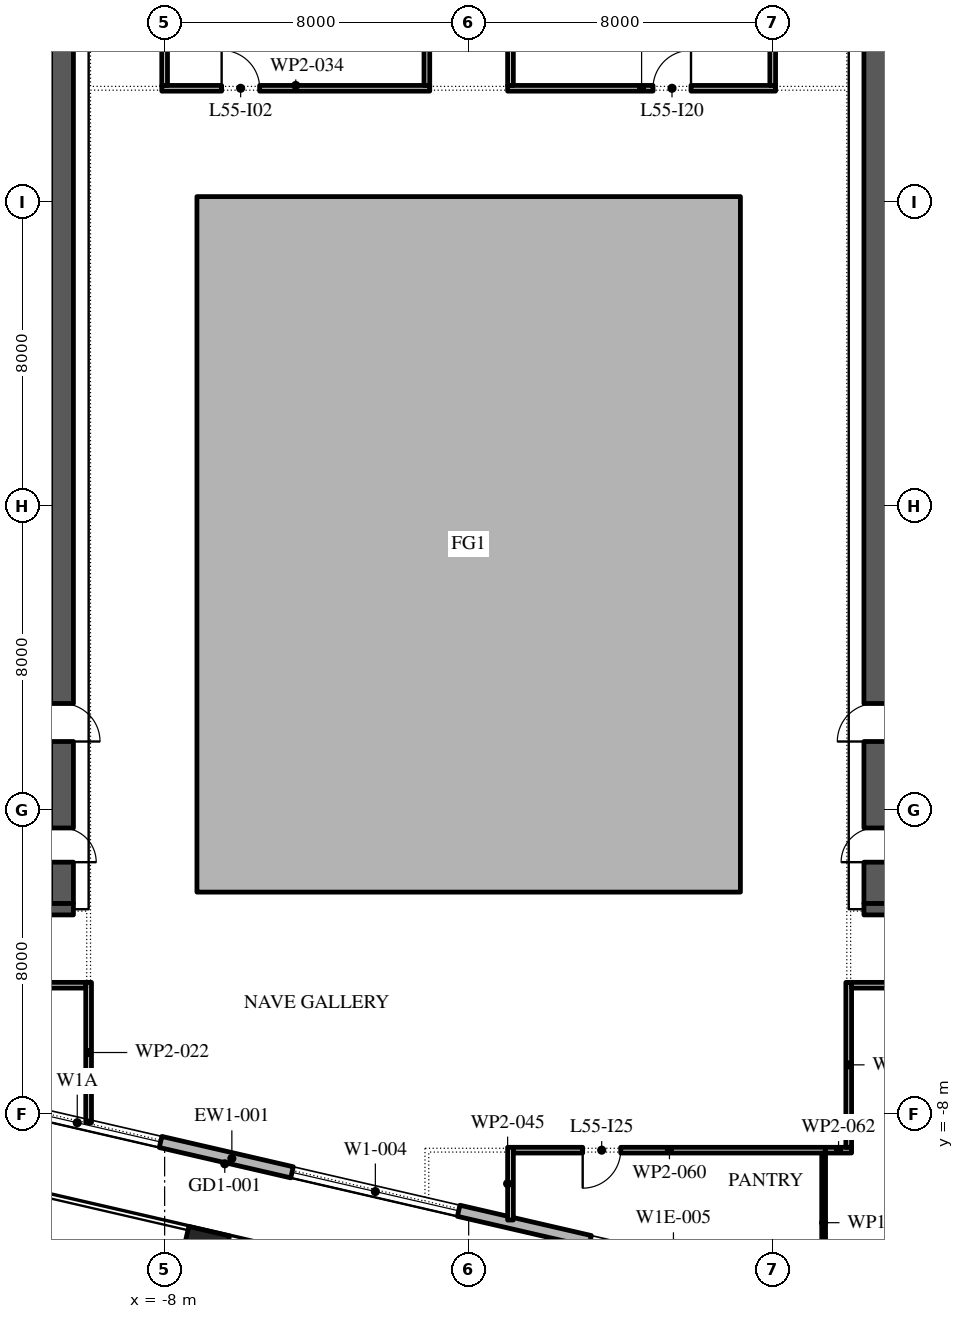
"""IFC4 building model, lengths in metres.
Left out: names, types, materials, properties, quantities, classifications, styles, units other than length and angle.
Written with IfcOpenShell. Run it as: python <this file> out.ifc"""

import sys

from ifc_helpers import new_model, si_unit, direction, frame, frame_2d, origin, origin_2d, place, context, subcontext, project, spatial, polyline, rectangle, outline, extrude, element, fill, save


model = new_model("IFC4")
c1 = context("Model", 3, precision=1e-05, world=origin(), true_north=direction((0.0, 1.0)))
c2 = subcontext(c1, "Body", "Model", "MODEL_VIEW")
j1 = project(units=[si_unit("LENGTHUNIT", "METRE"), si_unit("PLANEANGLEUNIT", "RADIAN")], contexts=[c1])
p1 = place(None, origin())
s1 = spatial("IfcSite", under=j1, at=p1, CompositionType="ELEMENT")
p2 = place(p1, origin())
s2 = spatial("IfcBuilding", under=s1, at=p2, CompositionType="ELEMENT")
p3 = place(p2, frame((0.0, 0.0, 255.6)))
s3 = spatial("IfcBuildingStorey", under=s2, at=p3, CompositionType="ELEMENT", Elevation=255.6)
p4 = place(p3, frame((-6.951, -11.608, 0.0), z_axis=(0.0, 0.0, 1.0), x_axis=(0.974370064785, -0.224951054344, 0.0)))
e1 = element("IfcColumn", 1, at=p4, inside=s3, PredefinedType="COLUMN", context=c2, shape_type="SweptSolid", body=[
    extrude(rectangle(XDim=1.1, YDim=1.1, at=origin_2d()), origin(), (0.0, 0.0, 1.0), 4.2),
])
p5 = place(p3, origin())
e2 = element("IfcWall", 2, at=p5, inside=s3, PredefinedType="STANDARD", context=c2, shape_type="SweptSolid", body=[
    extrude(outline(polyline([(-7.15, -2.15), (7.15, -2.15), (7.15, 16.15), (-7.15, 16.15), (-7.15, -2.15)]), holes=[polyline([(-7.0, -2.0), (-7.0, 16.0), (7.0, 16.0), (7.0, -2.0), (-7.0, -2.0)])]), origin(), (0.0, 0.0, 1.0), 4.0),
])
p6 = place(p3, frame((-29.616, -3.758, 0.0), z_axis=(0.0, 0.0, 1.0), x_axis=(0.974370532314, -0.224949029246, 0.0)))
e3 = element("IfcWall", 3, at=p6, inside=s3, PredefinedType="STANDARD", context=c2, shape_type="SweptSolid", body=[
    extrude(rectangle(XDim=48.0, YDim=0.3, at=frame_2d((24.0, 0.0))), origin(), (0.0, 0.0, 1.0), 4.0),
])
p7 = place(p6, frame((1.625, 0.0, 0.45)))
e4 = element("IfcOpeningElement", 4, at=p7, cuts=e3, PredefinedType="OPENING", context=c2, shape_type="SweptSolid", body=[
    extrude(rectangle(XDim=4.5, YDim=3.05, at=frame_2d((2.25, 1.525))), frame((0.0, 0.16, 0.0), z_axis=(0.0, -1.0, 0.0), x_axis=(1.0, 0.0, 0.0)), (0.0, 0.0, 1.0), 0.32),
])
p8 = place(p6, frame((10.575, 0.0, 0.0)))
e5 = element("IfcOpeningElement", 5, at=p8, cuts=e3, PredefinedType="OPENING", context=c2, shape_type="SweptSolid", body=[
    extrude(rectangle(XDim=2.4, YDim=3.5, at=frame_2d((1.2, 1.75))), frame((0.0, 0.16, 0.0), z_axis=(0.0, -1.0, 0.0), x_axis=(1.0, 0.0, 0.0)), (0.0, 0.0, 1.0), 0.32),
])
p9 = place(p6, frame((17.575, 0.0, 0.45)))
e6 = element("IfcOpeningElement", 6, at=p9, cuts=e3, PredefinedType="OPENING", context=c2, shape_type="SweptSolid", body=[
    extrude(rectangle(XDim=4.5, YDim=3.0, at=frame_2d((2.25, 1.5))), frame((0.0, 0.16, 0.0), z_axis=(0.0, -1.0, 0.0), x_axis=(1.0, 0.0, 0.0)), (0.0, 0.0, 1.0), 0.32),
])
p10 = place(p6, frame((25.625, 0.0, 0.45)))
e7 = element("IfcOpeningElement", 7, at=p10, cuts=e3, PredefinedType="OPENING", context=c2, shape_type="SweptSolid", body=[
    extrude(rectangle(XDim=4.5, YDim=3.05, at=frame_2d((2.25, 1.525))), frame((0.0, 0.16, 0.0), z_axis=(0.0, -1.0, 0.0), x_axis=(1.0, 0.0, 0.0)), (0.0, 0.0, 1.0), 0.32),
])
p11 = place(p6, frame((33.675, 0.0, 0.45)))
e8 = element("IfcOpeningElement", 8, at=p11, cuts=e3, PredefinedType="OPENING", context=c2, shape_type="SweptSolid", body=[
    extrude(rectangle(XDim=4.5, YDim=2.825, at=frame_2d((2.25, 1.413))), frame((0.0, 0.16, 0.0), z_axis=(0.0, -1.0, 0.0), x_axis=(1.0, 0.0, 0.0)), (0.0, 0.0, 1.0), 0.32),
])
p12 = place(p6, frame((42.775, 0.0, 0.0)))
e9 = element("IfcOpeningElement", 9, at=p12, cuts=e3, PredefinedType="OPENING", context=c2, shape_type="SweptSolid", body=[
    extrude(rectangle(XDim=2.4, YDim=3.5, at=frame_2d((1.2, 1.75))), frame((0.0, 0.16, 0.0), z_axis=(0.0, -1.0, 0.0), x_axis=(1.0, 0.0, 0.0)), (0.0, 0.0, 1.0), 0.32),
])
p13 = place(p3, frame((-10.7, -2.45, 0.0), z_axis=(0.0, 0.0, 1.0), x_axis=(0.0, 1.0, 0.0)))
e10 = element("IfcWall", 10, at=p13, inside=s3, PredefinedType="SHEAR", context=c2, shape_type="SweptSolid", body=[
    extrude(rectangle(XDim=27.9, YDim=0.6, at=frame_2d((13.95, 0.0))), origin(), (0.0, 0.0, 1.0), 4.0),
])
p14 = place(p13, frame((23.65, 0.0, 0.0)))
e11 = element("IfcOpeningElement", 11, at=p14, cuts=e10, PredefinedType="OPENING", context=c2, shape_type="SweptSolid", body=[
    extrude(rectangle(XDim=2.4, YDim=2.1, at=frame_2d((1.2, 1.05))), frame((0.0, 0.31, 0.0), z_axis=(0.0, -1.0, 0.0), x_axis=(1.0, 0.0, 0.0)), (0.0, 0.0, 1.0), 0.62),
])
p15 = place(p13, frame((1.087, 0.0, 0.0)))
e12 = element("IfcOpeningElement", 12, at=p15, cuts=e10, PredefinedType="OPENING", context=c2, shape_type="SweptSolid", body=[
    extrude(rectangle(XDim=0.9, YDim=2.1, at=frame_2d((0.45, 1.05))), frame((0.0, 0.31, 0.0), z_axis=(0.0, -1.0, 0.0), x_axis=(1.0, 0.0, 0.0)), (0.0, 0.0, 1.0), 0.62),
])
p16 = place(p13, frame((4.262, 0.0, 0.0)))
e13 = element("IfcOpeningElement", 13, at=p16, cuts=e10, PredefinedType="OPENING", context=c2, shape_type="SweptSolid", body=[
    extrude(rectangle(XDim=1.0, YDim=2.1, at=frame_2d((0.5, 1.05))), frame((0.0, 0.31, 0.0), z_axis=(0.0, -1.0, 0.0), x_axis=(1.0, 0.0, 0.0)), (0.0, 0.0, 1.0), 0.62),
])
p17 = place(p3, frame((-21.6, -2.6, 0.0), z_axis=(0.0, 0.0, 1.0), x_axis=(1.0, 0.0, 0.0)))
e14 = element("IfcWall", 14, at=p17, inside=s3, PredefinedType="SHEAR", context=c2, shape_type="SweptSolid", body=[
    extrude(rectangle(XDim=11.2, YDim=0.3, at=frame_2d((5.6, 0.0))), origin(), (0.0, 0.0, 1.0), 4.0),
])
p18 = place(p3, frame((10.7, -2.45, 0.0), z_axis=(0.0, 0.0, 1.0), x_axis=(0.0, 1.0, 0.0)))
e15 = element("IfcWall", 15, at=p18, inside=s3, PredefinedType="SHEAR", context=c2, shape_type="SweptSolid", body=[
    extrude(rectangle(XDim=27.9, YDim=0.6, at=frame_2d((13.95, 0.0))), origin(), (0.0, 0.0, 1.0), 4.0),
])
p19 = place(p18, frame((23.65, 0.0, 0.0)))
e16 = element("IfcOpeningElement", 16, at=p19, cuts=e15, PredefinedType="OPENING", context=c2, shape_type="SweptSolid", body=[
    extrude(rectangle(XDim=2.4, YDim=2.1, at=frame_2d((1.2, 1.05))), frame((0.0, 0.31, 0.0), z_axis=(0.0, -1.0, 0.0), x_axis=(1.0, 0.0, 0.0)), (0.0, 0.0, 1.0), 0.62),
])
p20 = place(p18, frame((1.087, 0.0, 0.0)))
e17 = element("IfcOpeningElement", 17, at=p20, cuts=e15, PredefinedType="OPENING", context=c2, shape_type="SweptSolid", body=[
    extrude(rectangle(XDim=0.9, YDim=2.1, at=frame_2d((0.45, 1.05))), frame((0.0, 0.31, 0.0), z_axis=(0.0, -1.0, 0.0), x_axis=(1.0, 0.0, 0.0)), (0.0, 0.0, 1.0), 0.62),
])
p21 = place(p18, frame((4.262, 0.0, 0.0)))
e18 = element("IfcOpeningElement", 18, at=p21, cuts=e15, PredefinedType="OPENING", context=c2, shape_type="SweptSolid", body=[
    extrude(rectangle(XDim=1.0, YDim=2.1, at=frame_2d((0.5, 1.05))), frame((0.0, 0.31, 0.0), z_axis=(0.0, -1.0, 0.0), x_axis=(1.0, 0.0, 0.0)), (0.0, 0.0, 1.0), 0.62),
])
p22 = place(p3, frame((10.4, -2.6, 0.0), z_axis=(0.0, 0.0, 1.0), x_axis=(1.0, 0.0, 0.0)))
e19 = element("IfcWall", 19, at=p22, inside=s3, PredefinedType="SHEAR", context=c2, shape_type="SweptSolid", body=[
    extrude(rectangle(XDim=11.2, YDim=0.3, at=frame_2d((5.6, 0.0))), origin(), (0.0, 0.0, 1.0), 4.0),
])
p23 = place(p3, frame((-10.0, -8.216, 0.0), z_axis=(0.0, 0.0, 1.0), x_axis=(0.0, 1.0, 0.0)))
e20 = element("IfcWall", 20, at=p23, inside=s3, PredefinedType="PARTITIONING", context=c2, shape_type="SweptSolid", body=[
    extrude(rectangle(XDim=3.691, YDim=0.15, at=frame_2d((1.846, 0.0))), origin(), (0.0, 0.0, 1.0), 4.0),
])
p24 = place(p3, frame((-10.075, -4.6, 0.0), z_axis=(0.0, 0.0, 1.0), x_axis=(-1.0, 0.0, 0.0)))
e21 = element("IfcWall", 21, at=p24, inside=s3, PredefinedType="PARTITIONING", context=c2, shape_type="SweptSolid", body=[
    extrude(rectangle(XDim=11.88, YDim=0.15, at=frame_2d((5.94, 0.0))), origin(), (0.0, 0.0, 1.0), 4.0),
])
p25 = place(p24, frame((3.055, 0.0, 0.0)))
e22 = element("IfcOpeningElement", 22, at=p25, cuts=e21, PredefinedType="OPENING", context=c2, shape_type="SweptSolid", body=[
    extrude(rectangle(XDim=1.0, YDim=2.1, at=frame_2d((0.5, 1.05))), frame((0.0, 0.085, 0.0), z_axis=(0.0, -1.0, 0.0), x_axis=(1.0, 0.0, 0.0)), (0.0, 0.0, 1.0), 0.17),
])
p26 = place(p3, frame((-8.075, 19.0, 0.0), z_axis=(0.0, 0.0, 1.0), x_axis=(1.0, 0.0, 0.0)))
e23 = element("IfcWall", 23, at=p26, inside=s3, PredefinedType="PARTITIONING", context=c2, shape_type="SweptSolid", body=[
    extrude(rectangle(XDim=7.05, YDim=0.15, at=frame_2d((3.525, 0.0))), origin(), (0.0, 0.0, 1.0), 4.0),
])
p27 = place(p26, frame((1.575, 0.0, 0.0)))
e24 = element("IfcOpeningElement", 24, at=p27, cuts=e23, PredefinedType="OPENING", context=c2, shape_type="SweptSolid", body=[
    extrude(rectangle(XDim=1.0, YDim=2.1, at=frame_2d((0.5, 1.05))), frame((0.0, 0.085, 0.0), z_axis=(0.0, -1.0, 0.0), x_axis=(1.0, 0.0, 0.0)), (0.0, 0.0, 1.0), 0.17),
])
p28 = place(p3, frame((-8.0, 22.72, 0.0), z_axis=(0.0, 0.0, 1.0), x_axis=(0.0, -1.0, 0.0)))
e25 = element("IfcWall", 25, at=p28, inside=s3, PredefinedType="PARTITIONING", context=c2, shape_type="SweptSolid", body=[
    extrude(rectangle(XDim=3.645, YDim=0.15, at=frame_2d((1.823, 0.0))), origin(), (0.0, 0.0, 1.0), 4.0),
])
p29 = place(p3, frame((-1.1, 19.075, 0.0), z_axis=(0.0, 0.0, 1.0), x_axis=(0.0, 1.0, 0.0)))
e26 = element("IfcWall", 26, at=p29, inside=s3, PredefinedType="PARTITIONING", context=c2, shape_type="SweptSolid", body=[
    extrude(rectangle(XDim=3.595, YDim=0.15, at=frame_2d((1.797, 0.0))), origin(), (0.0, 0.0, 1.0), 4.0),
])
p30 = place(p3, frame((1.1, -8.865, 0.0), z_axis=(0.0, 0.0, 1.0), x_axis=(0.0, -1.0, 0.0)))
e27 = element("IfcWall", 27, at=p30, inside=s3, PredefinedType="PARTITIONING", context=c2, shape_type="SweptSolid", body=[
    extrude(rectangle(XDim=1.913, YDim=0.15, at=frame_2d((0.957, 0.0))), origin(), (0.0, 0.0, 1.0), 4.0),
])
p31 = place(p3, frame((1.025, 19.0, 0.0), z_axis=(0.0, 0.0, 1.0), x_axis=(1.0, 0.0, 0.0)))
e28 = element("IfcWall", 28, at=p31, inside=s3, PredefinedType="PARTITIONING", context=c2, shape_type="SweptSolid", body=[
    extrude(rectangle(XDim=7.05, YDim=0.15, at=frame_2d((3.525, 0.0))), origin(), (0.0, 0.0, 1.0), 4.0),
])
p32 = place(p31, frame((3.825, 0.0, 0.0)))
e29 = element("IfcOpeningElement", 29, at=p32, cuts=e28, PredefinedType="OPENING", context=c2, shape_type="SweptSolid", body=[
    extrude(rectangle(XDim=1.0, YDim=2.1, at=frame_2d((0.5, 1.05))), frame((0.0, 0.085, 0.0), z_axis=(0.0, -1.0, 0.0), x_axis=(1.0, 0.0, 0.0)), (0.0, 0.0, 1.0), 0.17),
])
p33 = place(p3, frame((1.1, 24.0, 0.0), z_axis=(0.0, 0.0, 1.0), x_axis=(0.0, -1.0, 0.0)))
e30 = element("IfcWall", 30, at=p33, inside=s3, PredefinedType="PARTITIONING", context=c2, shape_type="SweptSolid", body=[
    extrude(rectangle(XDim=4.925, YDim=0.15, at=frame_2d((2.462, 0.0))), origin(), (0.0, 0.0, 1.0), 4.0),
])
p34 = place(p3, frame((8.0, 19.075, 0.0), z_axis=(0.0, 0.0, 1.0), x_axis=(0.0, 1.0, 0.0)))
e31 = element("IfcWall", 31, at=p34, inside=s3, PredefinedType="PARTITIONING", context=c2, shape_type="SweptSolid", body=[
    extrude(rectangle(XDim=4.875, YDim=0.15, at=frame_2d((2.438, 0.0))), origin(), (0.0, 0.0, 1.0), 4.0),
])
p35 = place(p3, frame((9.39, -8.94, 0.0), z_axis=(0.0, 0.0, 1.0), x_axis=(-1.0, 0.0, 0.0)))
e32 = element("IfcWall", 32, at=p35, inside=s3, PredefinedType="PARTITIONING", context=c2, shape_type="SweptSolid", body=[
    extrude(rectangle(XDim=8.215, YDim=0.15, at=frame_2d((4.107, 0.0))), origin(), (0.0, 0.0, 1.0), 4.0),
])
p36 = place(p35, frame((5.39, 0.0, 0.0)))
e33 = element("IfcOpeningElement", 33, at=p36, cuts=e32, PredefinedType="OPENING", context=c2, shape_type="SweptSolid", body=[
    extrude(rectangle(XDim=1.0, YDim=2.1, at=frame_2d((0.5, 1.05))), frame((0.0, 0.085, 0.0), z_axis=(0.0, -1.0, 0.0), x_axis=(1.0, 0.0, 0.0)), (0.0, 0.0, 1.0), 0.17),
])
p37 = place(p3, frame((9.34, -9.015, 0.0), z_axis=(0.0, 0.0, 1.0), x_axis=(0.0, -1.0, 0.0)))
e34 = element("IfcWall", 34, at=p37, inside=s3, PredefinedType="PARTITIONING", context=c2, shape_type="SweptSolid", body=[
    extrude(rectangle(XDim=3.666, YDim=0.1, at=frame_2d((1.833, 0.0))), origin(), (0.0, 0.0, 1.0), 4.0),
])
p38 = place(p3, frame((10.075, -8.94, 0.0), z_axis=(0.0, 0.0, 1.0), x_axis=(-1.0, 0.0, 0.0)))
e35 = element("IfcWall", 35, at=p38, inside=s3, PredefinedType="PARTITIONING", context=c2, shape_type="SweptSolid", body=[
    extrude(rectangle(XDim=0.685, YDim=0.15, at=frame_2d((0.343, 0.0))), origin(), (0.0, 0.0, 1.0), 4.0),
])
p39 = place(p3, frame((10.0, -4.525, 0.0), z_axis=(0.0, 0.0, 1.0), x_axis=(0.0, -1.0, 0.0)))
e36 = element("IfcWall", 36, at=p39, inside=s3, PredefinedType="PARTITIONING", context=c2, shape_type="SweptSolid", body=[
    extrude(rectangle(XDim=4.34, YDim=0.15, at=frame_2d((2.17, 0.0))), origin(), (0.0, 0.0, 1.0), 4.0),
])
p40 = place(p3, frame((17.24, -4.6, 0.0), z_axis=(0.0, 0.0, 1.0), x_axis=(-1.0, 0.0, 0.0)))
e37 = element("IfcWall", 37, at=p40, inside=s3, PredefinedType="PARTITIONING", context=c2, shape_type="SweptSolid", body=[
    extrude(rectangle(XDim=7.165, YDim=0.15, at=frame_2d((3.583, 0.0))), origin(), (0.0, 0.0, 1.0), 4.0),
])
p41 = place(p40, frame((4.59, 0.0, 0.0)))
e38 = element("IfcOpeningElement", 38, at=p41, cuts=e37, PredefinedType="OPENING", context=c2, shape_type="SweptSolid", body=[
    extrude(rectangle(XDim=1.0, YDim=2.1, at=frame_2d((0.5, 1.05))), frame((0.0, 0.085, 0.0), z_axis=(0.0, -1.0, 0.0), x_axis=(1.0, 0.0, 0.0)), (0.0, 0.0, 1.0), 0.17),
])
p42 = place(p9, origin())
e39 = element("IfcWindow", 39, at=p42, inside=s3, PartitioningType="DOUBLE_PANEL_VERTICAL", PredefinedType="WINDOW", context=c2, shape_type="SweptSolid", body=[
    extrude(rectangle(XDim=4.5, YDim=3.0, at=frame_2d((2.25, 1.5))), frame((0.0, 0.03, 0.0), z_axis=(0.0, -1.0, 0.0), x_axis=(1.0, 0.0, 0.0)), (0.0, 0.0, 1.0), 0.06),
])
fill(e6, e39)
p43 = place(p10, origin())
e40 = element("IfcWindow", 40, at=p43, inside=s3, PartitioningType="DOUBLE_PANEL_VERTICAL", PredefinedType="WINDOW", context=c2, shape_type="SweptSolid", body=[
    extrude(rectangle(XDim=4.5, YDim=3.05, at=frame_2d((2.25, 1.525))), frame((0.0, 0.03, 0.0), z_axis=(0.0, -1.0, 0.0), x_axis=(1.0, 0.0, 0.0)), (0.0, 0.0, 1.0), 0.06),
])
fill(e7, e40)
p44 = place(p27, origin())
e41 = element("IfcDoor", 41, at=p44, inside=s3, OperationType="SINGLE_SWING_RIGHT", PredefinedType="DOOR", context=c2, shape_type="SweptSolid", body=[
    extrude(rectangle(XDim=1.0, YDim=2.1, at=frame_2d((0.5, 1.05))), frame((0.0, 0.025, 0.0), z_axis=(0.0, -1.0, 0.0), x_axis=(1.0, 0.0, 0.0)), (0.0, 0.0, 1.0), 0.05),
])
fill(e24, e41)
p45 = place(p32, origin())
e42 = element("IfcDoor", 42, at=p45, inside=s3, OperationType="SINGLE_SWING_LEFT", PredefinedType="DOOR", context=c2, shape_type="SweptSolid", body=[
    extrude(rectangle(XDim=1.0, YDim=2.1, at=frame_2d((0.5, 1.05))), frame((0.0, 0.025, 0.0), z_axis=(0.0, -1.0, 0.0), x_axis=(1.0, 0.0, 0.0)), (0.0, 0.0, 1.0), 0.05),
])
fill(e29, e42)
p46 = place(p36, origin())
e43 = element("IfcDoor", 43, at=p46, inside=s3, OperationType="SINGLE_SWING_LEFT", PredefinedType="DOOR", context=c2, shape_type="SweptSolid", body=[
    extrude(rectangle(XDim=1.0, YDim=2.1, at=frame_2d((0.5, 1.05))), frame((0.0, 0.025, 0.0), z_axis=(0.0, -1.0, 0.0), x_axis=(1.0, 0.0, 0.0)), (0.0, 0.0, 1.0), 0.05),
])
fill(e33, e43)
save(model, sys.argv[1])
